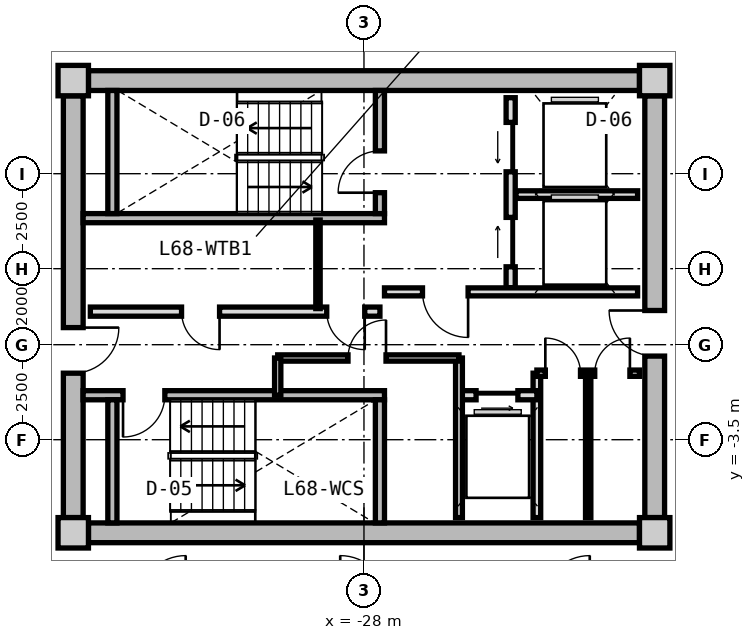
"""IFC4 building model, lengths in metres.
Left out: names, types, materials, properties, quantities, classifications, styles, units other than length and angle.
Written with IfcOpenShell. Run it as: python <this file> out.ifc"""

import sys

from ifc_helpers import new_model, si_unit, direction, frame, frame_2d, origin, origin_2d, place, context, subcontext, project, spatial, rectangle, extrude, source, transform, mapped, element, fill, save


model = new_model("IFC4")
c1 = context("Model", 3, precision=1e-05, world=origin(), true_north=direction((0.0, 1.0)))
c2 = subcontext(c1, "Body", "Model", "MODEL_VIEW")
j1 = project(units=[si_unit("LENGTHUNIT", "METRE"), si_unit("PLANEANGLEUNIT", "RADIAN")], contexts=[c1])
p1 = place(None, origin())
s1 = spatial("IfcSite", under=j1, at=p1, CompositionType="ELEMENT")
p2 = place(p1, origin())
s2 = spatial("IfcBuilding", under=s1, at=p2, CompositionType="ELEMENT")
p3 = place(p2, frame((0.0, 0.0, 220.0)))
s3 = spatial("IfcBuildingStorey", under=s2, at=p3, CompositionType="ELEMENT", Elevation=220.0)
m1 = source(origin(), c2, "Body", "SweptSolid", [
    extrude(rectangle(XDim=0.8, YDim=0.8, at=origin_2d()), origin(), (0.0, 0.0, 1.0), 3.05),
])
for number, where, z_axis, x_axis in (
    (1, (-35.65, -5.95, 0.0), (0.0, 0.0, 1.0), (1.0, 0.0, 0.0)),
    (2, (-20.35, -5.95, 0.0), (0.0, 0.0, 1.0), (1.0, 0.0, 0.0)),
    (3, (-20.35, 5.95, 0.0), (0.0, 0.0, 1.0), (1.0, 0.0, 0.0)),
    (4, (-35.65, 5.95, 0.0), (0.0, 0.0, 1.0), (1.0, 0.0, 0.0)),
):
    element("IfcColumn", number, at=place(p3, frame(where, z_axis=z_axis, x_axis=x_axis)), inside=s3, PredefinedType="COLUMN", context=c2, shape_type="MappedRepresentation", body=[
        mapped(m1, transform((0.0, 0.0, 0.0), x_axis=(1.0, 0.0, 0.0), y_axis=(0.0, 1.0, 0.0), z_axis=(0.0, 0.0, 1.0), scale=1.0)),
    ])
m2 = source(origin(), c2, "Body", "SweptSolid", [
    extrude(rectangle(XDim=14.5, YDim=0.52, at=frame_2d((7.25, 0.0))), origin(), (0.0, 0.0, 1.0), 2.76),
])
for number, where, z_axis, x_axis in (
    (5, (-35.25, 5.95, 0.0), (0.0, 0.0, 1.0), (1.0, 0.0, 0.0)),
    (6, (-20.75, -5.95, 0.0), (0.0, 0.0, 1.0), (-1.0, 0.0, 0.0)),
):
    element("IfcWall", number, at=place(p3, frame(where, z_axis=z_axis, x_axis=x_axis)), inside=s3, PredefinedType="SHEAR", context=c2, shape_type="MappedRepresentation", body=[
        mapped(m2, transform((0.0, 0.0, 0.0), x_axis=(1.0, 0.0, 0.0), y_axis=(0.0, 1.0, 0.0), z_axis=(0.0, 0.0, 1.0), scale=1.0)),
    ])
m3 = source(origin(), c2, "Body", "SweptSolid", [
    extrude(rectangle(XDim=11.1, YDim=0.52, at=frame_2d((5.55, 0.0))), origin(), (0.0, 0.0, 1.0), 2.76),
])
p4 = place(p3, frame((-35.65, -5.55, 0.0), z_axis=(0.0, 0.0, 1.0), x_axis=(0.0, 1.0, 0.0)))
e7 = element("IfcWall", 7, at=p4, inside=s3, PredefinedType="SHEAR", context=c2, shape_type="MappedRepresentation", body=[
    mapped(m3, transform((0.0, 0.0, 0.0), x_axis=(1.0, 0.0, 0.0), y_axis=(0.0, 1.0, 0.0), z_axis=(0.0, 0.0, 1.0), scale=1.0)),
])
p5 = place(p4, frame((3.8, 0.0, 0.0)))
e8 = element("IfcOpeningElement", 8, at=p5, cuts=e7, PredefinedType="OPENING", context=c2, shape_type="SweptSolid", body=[
    extrude(rectangle(XDim=1.2, YDim=2.15, at=frame_2d((0.6, 1.075))), frame((0.0, 0.27, 0.0), z_axis=(0.0, -1.0, 0.0), x_axis=(1.0, 0.0, 0.0)), (0.0, 0.0, 1.0), 0.54),
])
p6 = place(p3, frame((-20.35, 5.55, 0.0), z_axis=(0.0, 0.0, 1.0), x_axis=(0.0, -1.0, 0.0)))
e9 = element("IfcWall", 9, at=p6, inside=s3, PredefinedType="SHEAR", context=c2, shape_type="MappedRepresentation", body=[
    mapped(m3, transform((0.0, 0.0, 0.0), x_axis=(1.0, 0.0, 0.0), y_axis=(0.0, 1.0, 0.0), z_axis=(0.0, 0.0, 1.0), scale=1.0)),
])
p7 = place(p6, frame((5.65, 0.0, 0.0)))
e10 = element("IfcOpeningElement", 10, at=p7, cuts=e9, PredefinedType="OPENING", context=c2, shape_type="SweptSolid", body=[
    extrude(rectangle(XDim=1.2, YDim=2.15, at=frame_2d((0.6, 1.075))), frame((0.0, 0.27, 0.0), z_axis=(0.0, -1.0, 0.0), x_axis=(1.0, 0.0, 0.0)), (0.0, 0.0, 1.0), 0.54),
])
m4 = source(origin(), c2, "Body", "SweptSolid", [
    extrude(rectangle(XDim=7.93, YDim=0.24, at=frame_2d((3.965, 0.0))), origin(), (0.0, 0.0, 1.0), 2.76),
])
p8 = place(p3, frame((-35.39, 2.33, 0.0), z_axis=(0.0, 0.0, 1.0), x_axis=(1.0, 0.0, 0.0)))
e11 = element("IfcWall", 11, at=p8, inside=s3, PredefinedType="PARTITIONING", context=c2, shape_type="MappedRepresentation", body=[
    mapped(m4, transform((0.0, 0.0, 0.0), x_axis=(1.0, 0.0, 0.0), y_axis=(0.0, 1.0, 0.0), z_axis=(0.0, 0.0, 1.0), scale=1.0)),
])
m5 = source(origin(), c2, "Body", "SweptSolid", [
    extrude(rectangle(XDim=3.24, YDim=0.24, at=frame_2d((1.62, 0.0))), origin(), (0.0, 0.0, 1.0), 2.76),
])
p9 = place(p3, frame((-34.62, 2.45, 0.0), z_axis=(0.0, 0.0, 1.0), x_axis=(0.0, 1.0, 0.0)))
e12 = element("IfcWall", 12, at=p9, inside=s3, PredefinedType="PARTITIONING", context=c2, shape_type="MappedRepresentation", body=[
    mapped(m5, transform((0.0, 0.0, 0.0), x_axis=(1.0, 0.0, 0.0), y_axis=(0.0, 1.0, 0.0), z_axis=(0.0, 0.0, 1.0), scale=1.0)),
])
p10 = place(p3, frame((-27.58, 2.45, 0.0), z_axis=(0.0, 0.0, 1.0), x_axis=(0.0, 1.0, 0.0)))
e13 = element("IfcWall", 13, at=p10, inside=s3, PredefinedType="PARTITIONING", context=c2, shape_type="MappedRepresentation", body=[
    mapped(m5, transform((0.0, 0.0, 0.0), x_axis=(1.0, 0.0, 0.0), y_axis=(0.0, 1.0, 0.0), z_axis=(0.0, 0.0, 1.0), scale=1.0)),
])
p11 = place(p10, frame((0.55, 0.0, 0.0)))
e14 = element("IfcOpeningElement", 14, at=p11, cuts=e13, PredefinedType="OPENING", context=c2, shape_type="SweptSolid", body=[
    extrude(rectangle(XDim=1.1, YDim=2.15, at=frame_2d((0.55, 1.075))), frame((0.0, 0.13, 0.0), z_axis=(0.0, -1.0, 0.0), x_axis=(1.0, 0.0, 0.0)), (0.0, 0.0, 1.0), 0.26),
])
p12 = place(p3, frame((-35.39, -2.33, 0.0), z_axis=(0.0, 0.0, 1.0), x_axis=(1.0, 0.0, 0.0)))
e15 = element("IfcWall", 15, at=p12, inside=s3, PredefinedType="PARTITIONING", context=c2, shape_type="MappedRepresentation", body=[
    mapped(m4, transform((0.0, 0.0, 0.0), x_axis=(1.0, 0.0, 0.0), y_axis=(0.0, 1.0, 0.0), z_axis=(0.0, 0.0, 1.0), scale=1.0)),
])
p13 = place(p12, frame((1.05, 0.0, 0.0)))
e16 = element("IfcOpeningElement", 16, at=p13, cuts=e15, PredefinedType="OPENING", context=c2, shape_type="SweptSolid", body=[
    extrude(rectangle(XDim=1.1, YDim=2.15, at=frame_2d((0.55, 1.075))), frame((0.0, 0.13, 0.0), z_axis=(0.0, -1.0, 0.0), x_axis=(1.0, 0.0, 0.0)), (0.0, 0.0, 1.0), 0.26),
])
for number, where, z_axis, x_axis in (
    (17, (-34.62, -5.69, 0.0), (0.0, 0.0, 1.0), (0.0, 1.0, 0.0)),
    (18, (-27.58, -5.69, 0.0), (0.0, 0.0, 1.0), (0.0, 1.0, 0.0)),
):
    element("IfcWall", number, at=place(p3, frame(where, z_axis=z_axis, x_axis=x_axis)), inside=s3, PredefinedType="PARTITIONING", context=c2, shape_type="MappedRepresentation", body=[
        mapped(m5, transform((0.0, 0.0, 0.0), x_axis=(1.0, 0.0, 0.0), y_axis=(0.0, 1.0, 0.0), z_axis=(0.0, 0.0, 1.0), scale=1.0)),
    ])
m6 = source(origin(), c2, "Body", "SweptSolid", [
    extrude(rectangle(XDim=5.0, YDim=0.24, at=frame_2d((2.5, 0.0))), origin(), (0.0, 0.0, 1.0), 2.745),
])
p14 = place(p3, frame((-24.14, 0.5, 0.0), z_axis=(0.0, 0.0, 1.0), x_axis=(0.0, 1.0, 0.0)))
e19 = element("IfcWall", 19, at=p14, inside=s3, PredefinedType="PARTITIONING", context=c2, shape_type="MappedRepresentation", body=[
    mapped(m6, transform((0.0, 0.0, 0.0), x_axis=(1.0, 0.0, 0.0), y_axis=(0.0, 1.0, 0.0), z_axis=(0.0, 0.0, 1.0), scale=1.0)),
])
p15 = place(p14, frame((3.05, 0.0, 0.0)))
e20 = element("IfcOpeningElement", 20, at=p15, cuts=e19, PredefinedType="OPENING", context=c2, shape_type="SweptSolid", body=[
    extrude(rectangle(XDim=1.3, YDim=2.2, at=frame_2d((0.65, 1.1))), frame((0.0, 0.13, 0.0), z_axis=(0.0, -1.0, 0.0), x_axis=(1.0, 0.0, 0.0)), (0.0, 0.0, 1.0), 0.26),
])
p16 = place(p14, frame((0.55, 0.0, 0.0)))
e21 = element("IfcOpeningElement", 21, at=p16, cuts=e19, PredefinedType="OPENING", context=c2, shape_type="SweptSolid", body=[
    extrude(rectangle(XDim=1.3, YDim=2.2, at=frame_2d((0.65, 1.1))), frame((0.0, 0.13, 0.0), z_axis=(0.0, -1.0, 0.0), x_axis=(1.0, 0.0, 0.0)), (0.0, 0.0, 1.0), 0.26),
])
m7 = source(origin(), c2, "Body", "SweptSolid", [
    extrude(rectangle(XDim=3.2, YDim=0.2, at=frame_2d((1.6, 0.0))), origin(), (0.0, 0.0, 1.0), 2.745),
])
p17 = place(p3, frame((-24.0, 2.95, 0.0), z_axis=(0.0, 0.0, 1.0), x_axis=(1.0, 0.0, 0.0)))
e22 = element("IfcWall", 22, at=p17, inside=s3, PredefinedType="PARTITIONING", context=c2, shape_type="MappedRepresentation", body=[
    mapped(m7, transform((0.0, 0.0, 0.0), x_axis=(1.0, 0.0, 0.0), y_axis=(0.0, 1.0, 0.0), z_axis=(0.0, 0.0, 1.0), scale=1.0)),
])
m8 = source(origin(), c2, "Body", "SweptSolid", [
    extrude(rectangle(XDim=6.66, YDim=0.21, at=frame_2d((3.33, 0.0))), origin(), (0.0, 0.0, 1.0), 2.745),
])
p18 = place(p3, frame((-27.46, 0.39, 0.0), z_axis=(0.0, 0.0, 1.0), x_axis=(1.0, 0.0, 0.0)))
e23 = element("IfcWall", 23, at=p18, inside=s3, PredefinedType="PARTITIONING", context=c2, shape_type="MappedRepresentation", body=[
    mapped(m8, transform((0.0, 0.0, 0.0), x_axis=(1.0, 0.0, 0.0), y_axis=(0.0, 1.0, 0.0), z_axis=(0.0, 0.0, 1.0), scale=1.0)),
])
p19 = place(p18, frame((1.0, 0.0, 0.0)))
e24 = element("IfcOpeningElement", 24, at=p19, cuts=e23, PredefinedType="OPENING", context=c2, shape_type="SweptSolid", body=[
    extrude(rectangle(XDim=1.2, YDim=2.15, at=frame_2d((0.6, 1.075))), frame((0.0, 0.115, 0.0), z_axis=(0.0, -1.0, 0.0), x_axis=(1.0, 0.0, 0.0)), (0.0, 0.0, 1.0), 0.23),
])
m9 = source(origin(), c2, "Body", "SweptSolid", [
    extrude(rectangle(XDim=7.62, YDim=0.24, at=frame_2d((3.81, 0.0))), origin(), (0.0, 0.0, 1.0), 2.745),
])
p20 = place(p3, frame((-35.2, -0.13, 0.0), z_axis=(0.0, 0.0, 1.0), x_axis=(1.0, 0.0, 0.0)))
e25 = element("IfcWall", 25, at=p20, inside=s3, PredefinedType="PARTITIONING", context=c2, shape_type="MappedRepresentation", body=[
    mapped(m9, transform((0.0, 0.0, 0.0), x_axis=(1.0, 0.0, 0.0), y_axis=(0.0, 1.0, 0.0), z_axis=(0.0, 0.0, 1.0), scale=1.0)),
])
p21 = place(p20, frame((6.22, 0.0, 0.0)))
e26 = element("IfcOpeningElement", 26, at=p21, cuts=e25, PredefinedType="OPENING", context=c2, shape_type="SweptSolid", body=[
    extrude(rectangle(XDim=1.0, YDim=2.1, at=frame_2d((0.5, 1.05))), frame((0.0, 0.13, 0.0), z_axis=(0.0, -1.0, 0.0), x_axis=(1.0, 0.0, 0.0)), (0.0, 0.0, 1.0), 0.26),
])
p22 = place(p20, frame((2.4, 0.0, 0.0)))
e27 = element("IfcOpeningElement", 27, at=p22, cuts=e25, PredefinedType="OPENING", context=c2, shape_type="SweptSolid", body=[
    extrude(rectangle(XDim=1.0, YDim=2.1, at=frame_2d((0.5, 1.05))), frame((0.0, 0.13, 0.0), z_axis=(0.0, -1.0, 0.0), x_axis=(1.0, 0.0, 0.0)), (0.0, 0.0, 1.0), 0.26),
])
m10 = source(origin(), c2, "Body", "SweptSolid", [
    extrude(rectangle(XDim=2.33, YDim=0.115, at=frame_2d((1.165, 0.0))), origin(), (0.0, 0.0, 1.0), 2.745),
])
p23 = place(p3, frame((-29.21, -0.05, 0.0), z_axis=(0.0, 0.0, 1.0), x_axis=(0.0, 1.0, 0.0)))
e28 = element("IfcWall", 28, at=p23, inside=s3, PredefinedType="PARTITIONING", context=c2, shape_type="MappedRepresentation", body=[
    mapped(m10, transform((0.0, 0.0, 0.0), x_axis=(1.0, 0.0, 0.0), y_axis=(0.0, 1.0, 0.0), z_axis=(0.0, 0.0, 1.0), scale=1.0)),
])
m11 = source(origin(), c2, "Body", "SweptSolid", [
    extrude(rectangle(XDim=3.8, YDim=0.2, at=frame_2d((1.9, 0.0))), origin(), (0.0, 0.0, 1.0), 2.745),
])
p24 = place(p3, frame((-23.45, -5.55, 0.0), z_axis=(0.0, 0.0, 1.0), x_axis=(0.0, 1.0, 0.0)))
e29 = element("IfcWall", 29, at=p24, inside=s3, PredefinedType="PARTITIONING", context=c2, shape_type="MappedRepresentation", body=[
    mapped(m11, transform((0.0, 0.0, 0.0), x_axis=(1.0, 0.0, 0.0), y_axis=(0.0, 1.0, 0.0), z_axis=(0.0, 0.0, 1.0), scale=1.0)),
])
m12 = source(origin(), c2, "Body", "SweptSolid", [
    extrude(rectangle(XDim=2.05, YDim=0.24, at=frame_2d((1.025, 0.0))), origin(), (0.0, 0.0, 1.0), 2.745),
])
p25 = place(p3, frame((-25.5, -2.33, 0.0), z_axis=(0.0, 0.0, 1.0), x_axis=(1.0, 0.0, 0.0)))
e30 = element("IfcWall", 30, at=p25, inside=s3, PredefinedType="PARTITIONING", context=c2, shape_type="MappedRepresentation", body=[
    mapped(m12, transform((0.0, 0.0, 0.0), x_axis=(1.0, 0.0, 0.0), y_axis=(0.0, 1.0, 0.0), z_axis=(0.0, 0.0, 1.0), scale=1.0)),
])
p26 = place(p25, frame((0.45, 0.0, 0.0)))
e31 = element("IfcOpeningElement", 31, at=p26, cuts=e30, PredefinedType="OPENING", context=c2, shape_type="SweptSolid", body=[
    extrude(rectangle(XDim=1.1, YDim=2.2, at=frame_2d((0.55, 1.1))), frame((0.0, 0.13, 0.0), z_axis=(0.0, -1.0, 0.0), x_axis=(1.0, 0.0, 0.0)), (0.0, 0.0, 1.0), 0.26),
])
m13 = source(origin(), c2, "Body", "SweptSolid", [
    extrude(rectangle(XDim=4.2, YDim=0.18, at=frame_2d((2.1, 0.0))), origin(), (0.0, 0.0, 1.0), 2.745),
])
p27 = place(p3, frame((-25.5, -5.55, 0.0), z_axis=(0.0, 0.0, 1.0), x_axis=(0.0, 1.0, 0.0)))
e32 = element("IfcWall", 32, at=p27, inside=s3, PredefinedType="PARTITIONING", context=c2, shape_type="MappedRepresentation", body=[
    mapped(m13, transform((0.0, 0.0, 0.0), x_axis=(1.0, 0.0, 0.0), y_axis=(0.0, 1.0, 0.0), z_axis=(0.0, 0.0, 1.0), scale=1.0)),
])
m14 = source(origin(), c2, "Body", "SweptSolid", [
    extrude(rectangle(XDim=4.77, YDim=0.165, at=frame_2d((2.385, 0.0))), origin(), (0.0, 0.0, 1.0), 2.745),
])
p28 = place(p3, frame((-30.27, -1.35, 0.0), z_axis=(0.0, 0.0, 1.0), x_axis=(1.0, 0.0, 0.0)))
e33 = element("IfcWall", 33, at=p28, inside=s3, PredefinedType="PARTITIONING", context=c2, shape_type="MappedRepresentation", body=[
    mapped(m14, transform((0.0, 0.0, 0.0), x_axis=(1.0, 0.0, 0.0), y_axis=(0.0, 1.0, 0.0), z_axis=(0.0, 0.0, 1.0), scale=1.0)),
])
p29 = place(p28, frame((1.85, 0.0, 0.0)))
e34 = element("IfcOpeningElement", 34, at=p29, cuts=e33, PredefinedType="OPENING", context=c2, shape_type="SweptSolid", body=[
    extrude(rectangle(XDim=1.0, YDim=2.1, at=frame_2d((0.5, 1.05))), frame((0.0, 0.093, 0.0), z_axis=(0.0, -1.0, 0.0), x_axis=(1.0, 0.0, 0.0)), (0.0, 0.0, 1.0), 0.185),
])
m15 = source(origin(), c2, "Body", "SweptSolid", [
    extrude(rectangle(XDim=0.98, YDim=0.165, at=frame_2d((0.49, 0.0))), origin(), (0.0, 0.0, 1.0), 2.745),
])
p30 = place(p3, frame((-30.27, -2.33, 0.0), z_axis=(0.0, 0.0, 1.0), x_axis=(0.0, 1.0, 0.0)))
e35 = element("IfcWall", 35, at=p30, inside=s3, PredefinedType="PARTITIONING", context=c2, shape_type="MappedRepresentation", body=[
    mapped(m15, transform((0.0, 0.0, 0.0), x_axis=(1.0, 0.0, 0.0), y_axis=(0.0, 1.0, 0.0), z_axis=(0.0, 0.0, 1.0), scale=1.0)),
])
m16 = source(origin(), c2, "Body", "SweptSolid", [
    extrude(rectangle(XDim=2.7, YDim=0.165, at=frame_2d((1.35, 0.0))), origin(), (0.0, 0.0, 1.0), 2.745),
])
p31 = place(p3, frame((-23.45, -1.75, 0.0), z_axis=(0.0, 0.0, 1.0), x_axis=(1.0, 0.0, 0.0)))
e36 = element("IfcWall", 36, at=p31, inside=s3, PredefinedType="PARTITIONING", context=c2, shape_type="MappedRepresentation", body=[
    mapped(m16, transform((0.0, 0.0, 0.0), x_axis=(1.0, 0.0, 0.0), y_axis=(0.0, 1.0, 0.0), z_axis=(0.0, 0.0, 1.0), scale=1.0)),
])
p32 = place(p31, frame((0.222, 0.0, 0.0)))
e37 = element("IfcOpeningElement", 37, at=p32, cuts=e36, PredefinedType="OPENING", context=c2, shape_type="SweptSolid", body=[
    extrude(rectangle(XDim=0.925, YDim=2.1, at=frame_2d((0.462, 1.05))), frame((0.0, 0.093, 0.0), z_axis=(0.0, -1.0, 0.0), x_axis=(1.0, 0.0, 0.0)), (0.0, 0.0, 1.0), 0.185),
])
p33 = place(p31, frame((1.522, 0.0, 0.0)))
e38 = element("IfcOpeningElement", 38, at=p33, cuts=e36, PredefinedType="OPENING", context=c2, shape_type="SweptSolid", body=[
    extrude(rectangle(XDim=0.925, YDim=2.1, at=frame_2d((0.462, 1.05))), frame((0.0, 0.093, 0.0), z_axis=(0.0, -1.0, 0.0), x_axis=(1.0, 0.0, 0.0)), (0.0, 0.0, 1.0), 0.185),
])
m17 = source(origin(), c2, "Body", "SweptSolid", [
    extrude(rectangle(XDim=3.8, YDim=0.14, at=frame_2d((1.9, 0.0))), origin(), (0.0, 0.0, 1.0), 2.745),
])
p34 = place(p3, frame((-22.1, -5.55, 0.0), z_axis=(0.0, 0.0, 1.0), x_axis=(0.0, 1.0, 0.0)))
e39 = element("IfcWall", 39, at=p34, inside=s3, PredefinedType="PARTITIONING", context=c2, shape_type="MappedRepresentation", body=[
    mapped(m17, transform((0.0, 0.0, 0.0), x_axis=(1.0, 0.0, 0.0), y_axis=(0.0, 1.0, 0.0), z_axis=(0.0, 0.0, 1.0), scale=1.0)),
])
m18 = source(origin(), c2, "Body", "SweptSolid", [
    extrude(rectangle(XDim=1.1, YDim=2.15, at=frame_2d((0.55, 1.075))), frame((0.0, 0.025, 0.0), z_axis=(0.0, -1.0, 0.0), x_axis=(1.0, 0.0, 0.0)), (0.0, 0.0, 1.0), 0.05),
])
p35 = place(p11, origin())
e40 = element("IfcDoor", 40, at=p35, inside=s3, OperationType="SINGLE_SWING_LEFT", PredefinedType="DOOR", context=c2, shape_type="MappedRepresentation", body=[
    mapped(m18, transform((0.0, 0.0, 0.0), x_axis=(1.0, 0.0, 0.0), y_axis=(0.0, 1.0, 0.0), z_axis=(0.0, 0.0, 1.0), scale=1.0)),
])
fill(e14, e40)
p36 = place(p13, frame((1.1, 0.0, 0.0), z_axis=(0.0, 0.0, 1.0), x_axis=(-1.0, 0.0, 0.0)))
e41 = element("IfcDoor", 41, at=p36, inside=s3, OperationType="SINGLE_SWING_RIGHT", PredefinedType="DOOR", context=c2, shape_type="MappedRepresentation", body=[
    mapped(m18, transform((0.0, 0.0, 0.0), x_axis=(1.0, 0.0, 0.0), y_axis=(0.0, 1.0, 0.0), z_axis=(0.0, 0.0, 1.0), scale=1.0)),
])
fill(e16, e41)
m19 = source(origin(), c2, "Body", "SweptSolid", [
    extrude(rectangle(XDim=1.3, YDim=2.2, at=frame_2d((0.65, 1.1))), frame((0.0, 0.025, 0.0), z_axis=(0.0, -1.0, 0.0), x_axis=(1.0, 0.0, 0.0)), (0.0, 0.0, 1.0), 0.05),
])
p37 = place(p15, origin())
e42 = element("IfcDoor", 42, at=p37, inside=s3, OperationType="SLIDING_TO_LEFT", PredefinedType="DOOR", context=c2, shape_type="MappedRepresentation", body=[
    mapped(m19, transform((0.0, 0.0, 0.0), x_axis=(1.0, 0.0, 0.0), y_axis=(0.0, 1.0, 0.0), z_axis=(0.0, 0.0, 1.0), scale=1.0)),
])
fill(e20, e42)
p38 = place(p16, origin())
e43 = element("IfcDoor", 43, at=p38, inside=s3, OperationType="SLIDING_TO_RIGHT", PredefinedType="DOOR", context=c2, shape_type="MappedRepresentation", body=[
    mapped(m19, transform((0.0, 0.0, 0.0), x_axis=(1.0, 0.0, 0.0), y_axis=(0.0, 1.0, 0.0), z_axis=(0.0, 0.0, 1.0), scale=1.0)),
])
fill(e21, e43)
m20 = source(origin(), c2, "Body", "SweptSolid", [
    extrude(rectangle(XDim=1.2, YDim=2.15, at=frame_2d((0.6, 1.075))), frame((0.0, 0.025, 0.0), z_axis=(0.0, -1.0, 0.0), x_axis=(1.0, 0.0, 0.0)), (0.0, 0.0, 1.0), 0.05),
])
p39 = place(p19, frame((1.2, 0.0, 0.0), z_axis=(0.0, 0.0, 1.0), x_axis=(-1.0, 0.0, 0.0)))
e44 = element("IfcDoor", 44, at=p39, inside=s3, OperationType="SINGLE_SWING_LEFT", PredefinedType="DOOR", context=c2, shape_type="MappedRepresentation", body=[
    mapped(m20, transform((0.0, 0.0, 0.0), x_axis=(1.0, 0.0, 0.0), y_axis=(0.0, 1.0, 0.0), z_axis=(0.0, 0.0, 1.0), scale=1.0)),
])
fill(e24, e44)
p40 = place(p5, frame((1.2, 0.0, 0.0), z_axis=(0.0, 0.0, 1.0), x_axis=(-1.0, 0.0, 0.0)))
e45 = element("IfcDoor", 45, at=p40, inside=s3, OperationType="SINGLE_SWING_LEFT", PredefinedType="DOOR", context=c2, shape_type="MappedRepresentation", body=[
    mapped(m20, transform((0.0, 0.0, 0.0), x_axis=(1.0, 0.0, 0.0), y_axis=(0.0, 1.0, 0.0), z_axis=(0.0, 0.0, 1.0), scale=1.0)),
])
fill(e8, e45)
p41 = place(p7, frame((1.2, 0.0, 0.0), z_axis=(0.0, 0.0, 1.0), x_axis=(-1.0, 0.0, 0.0)))
e46 = element("IfcDoor", 46, at=p41, inside=s3, OperationType="SINGLE_SWING_RIGHT", PredefinedType="DOOR", context=c2, shape_type="MappedRepresentation", body=[
    mapped(m20, transform((0.0, 0.0, 0.0), x_axis=(1.0, 0.0, 0.0), y_axis=(0.0, 1.0, 0.0), z_axis=(0.0, 0.0, 1.0), scale=1.0)),
])
fill(e10, e46)
m21 = source(origin(), c2, "Body", "SweptSolid", [
    extrude(rectangle(XDim=1.0, YDim=2.1, at=frame_2d((0.5, 1.05))), frame((0.0, 0.025, 0.0), z_axis=(0.0, -1.0, 0.0), x_axis=(1.0, 0.0, 0.0)), (0.0, 0.0, 1.0), 0.05),
])
p42 = place(p21, frame((1.0, 0.0, 0.0), z_axis=(0.0, 0.0, 1.0), x_axis=(-1.0, 0.0, 0.0)))
e47 = element("IfcDoor", 47, at=p42, inside=s3, OperationType="SINGLE_SWING_LEFT", PredefinedType="DOOR", context=c2, shape_type="MappedRepresentation", body=[
    mapped(m21, transform((0.0, 0.0, 0.0), x_axis=(1.0, 0.0, 0.0), y_axis=(0.0, 1.0, 0.0), z_axis=(0.0, 0.0, 1.0), scale=1.0)),
])
fill(e26, e47)
p43 = place(p22, frame((1.0, 0.0, 0.0), z_axis=(0.0, 0.0, 1.0), x_axis=(-1.0, 0.0, 0.0)))
e48 = element("IfcDoor", 48, at=p43, inside=s3, OperationType="SINGLE_SWING_LEFT", PredefinedType="DOOR", context=c2, shape_type="MappedRepresentation", body=[
    mapped(m21, transform((0.0, 0.0, 0.0), x_axis=(1.0, 0.0, 0.0), y_axis=(0.0, 1.0, 0.0), z_axis=(0.0, 0.0, 1.0), scale=1.0)),
])
fill(e27, e48)
m22 = source(origin(), c2, "Body", "SweptSolid", [
    extrude(rectangle(XDim=1.1, YDim=2.2, at=frame_2d((0.55, 1.1))), frame((0.0, 0.025, 0.0), z_axis=(0.0, -1.0, 0.0), x_axis=(1.0, 0.0, 0.0)), (0.0, 0.0, 1.0), 0.05),
])
p44 = place(p26, frame((1.1, 0.0, 0.0), z_axis=(0.0, 0.0, 1.0), x_axis=(-1.0, 0.0, 0.0)))
e49 = element("IfcDoor", 49, at=p44, inside=s3, OperationType="SLIDING_TO_RIGHT", PredefinedType="DOOR", context=c2, shape_type="MappedRepresentation", body=[
    mapped(m22, transform((0.0, 0.0, 0.0), x_axis=(1.0, 0.0, 0.0), y_axis=(0.0, 1.0, 0.0), z_axis=(0.0, 0.0, 1.0), scale=1.0)),
])
fill(e31, e49)
p45 = place(p29, origin())
e50 = element("IfcDoor", 50, at=p45, inside=s3, OperationType="SINGLE_SWING_RIGHT", PredefinedType="DOOR", context=c2, shape_type="MappedRepresentation", body=[
    mapped(m21, transform((0.0, 0.0, 0.0), x_axis=(1.0, 0.0, 0.0), y_axis=(0.0, 1.0, 0.0), z_axis=(0.0, 0.0, 1.0), scale=1.0)),
])
fill(e34, e50)
m23 = source(origin(), c2, "Body", "SweptSolid", [
    extrude(rectangle(XDim=0.925, YDim=2.1, at=frame_2d((0.462, 1.05))), frame((0.0, 0.025, 0.0), z_axis=(0.0, -1.0, 0.0), x_axis=(1.0, 0.0, 0.0)), (0.0, 0.0, 1.0), 0.05),
])
p46 = place(p32, origin())
e51 = element("IfcDoor", 51, at=p46, inside=s3, OperationType="SINGLE_SWING_LEFT", PredefinedType="DOOR", context=c2, shape_type="MappedRepresentation", body=[
    mapped(m23, transform((0.0, 0.0, 0.0), x_axis=(1.0, 0.0, 0.0), y_axis=(0.0, 1.0, 0.0), z_axis=(0.0, 0.0, 1.0), scale=1.0)),
])
fill(e37, e51)
p47 = place(p33, origin())
e52 = element("IfcDoor", 52, at=p47, inside=s3, OperationType="SINGLE_SWING_RIGHT", PredefinedType="DOOR", context=c2, shape_type="MappedRepresentation", body=[
    mapped(m23, transform((0.0, 0.0, 0.0), x_axis=(1.0, 0.0, 0.0), y_axis=(0.0, 1.0, 0.0), z_axis=(0.0, 0.0, 1.0), scale=1.0)),
])
fill(e38, e52)
save(model, sys.argv[1])
